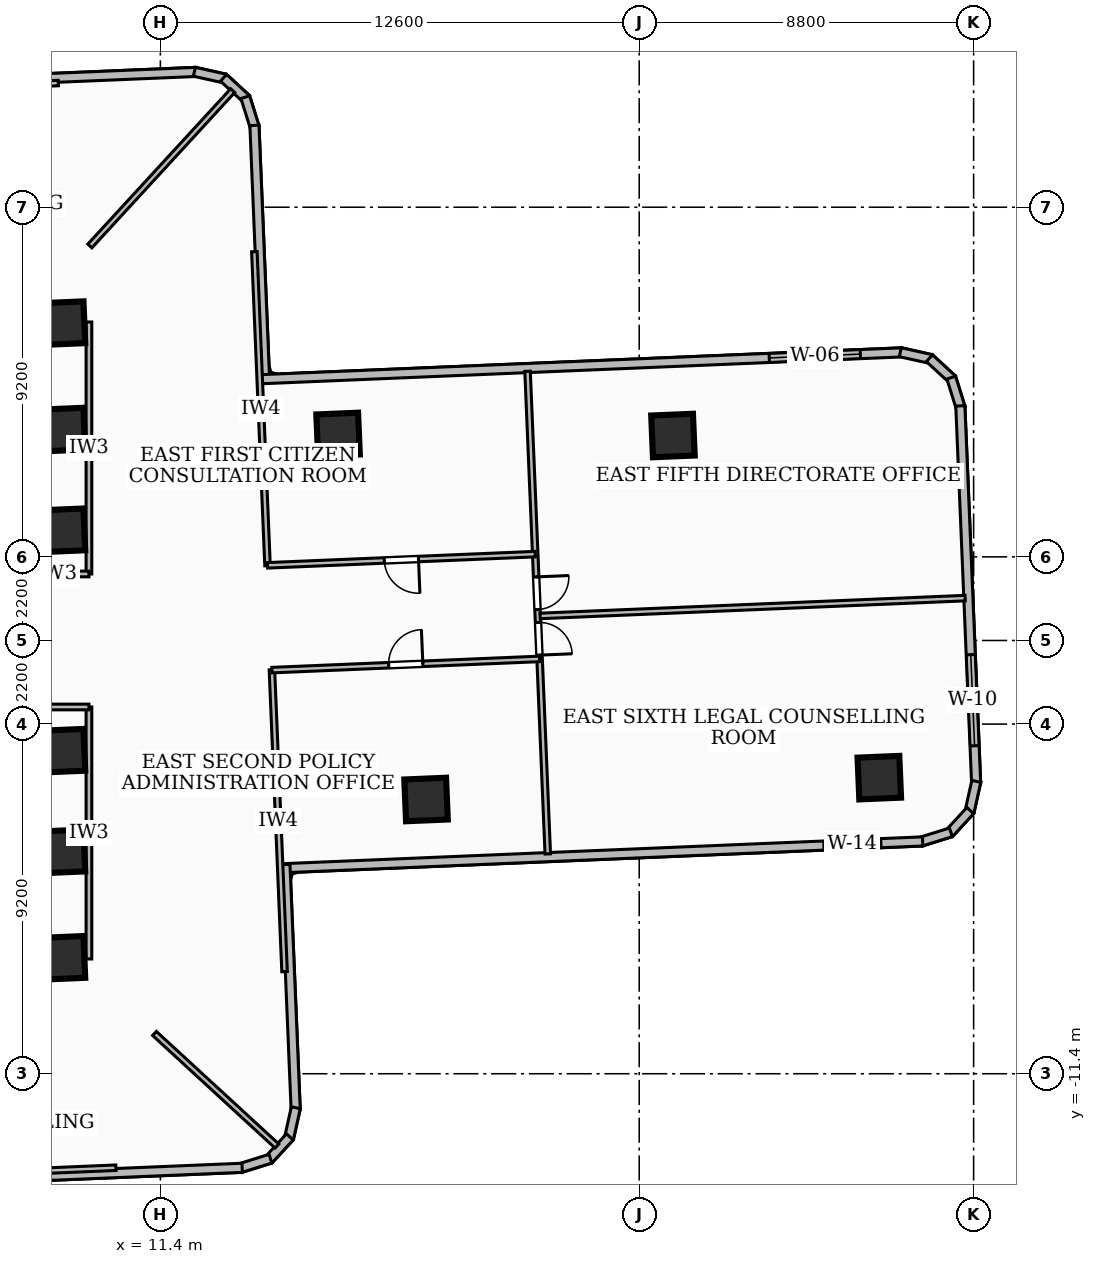
"""IFC4 building model, lengths in metres.
Left out: names, types, materials, properties, quantities, classifications, styles, units other than length and angle.
Written with IfcOpenShell. Run it as: python <this file> out.ifc"""

import sys

from ifc_helpers import new_model, si_unit, direction, frame, frame_2d, origin, origin_2d, place, context, subcontext, project, spatial, rectangle, extrude, element, fill, save


model = new_model("IFC4")
c1 = context("Model", 3, precision=1e-05, world=origin(), true_north=direction((0.0, 1.0)))
c2 = subcontext(c1, "Body", "Model", "MODEL_VIEW")
j1 = project(units=[si_unit("LENGTHUNIT", "METRE"), si_unit("PLANEANGLEUNIT", "RADIAN")], contexts=[c1])
p1 = place(None, origin())
s1 = spatial("IfcSite", under=j1, at=p1, CompositionType="ELEMENT")
p2 = place(p1, origin())
s2 = spatial("IfcBuilding", under=s1, at=p2, CompositionType="ELEMENT")
p3 = place(p2, frame((0.0, 0.0, 42.48)))
s3 = spatial("IfcBuildingStorey", under=s2, at=p3, CompositionType="ELEMENT", Elevation=42.48)
for number, where, z_axis, x_axis in (
    (1, (-8.78, 8.585, 0.0), (0.0, 0.0, 1.0), (1.0, 0.0, 0.0)),
    (2, (8.78, -8.585, 0.0), (0.0, 0.0, 1.0), (-1.0, 0.0, 0.0)),
):
    element("IfcWall", number, at=place(p3, frame(where, z_axis=z_axis, x_axis=x_axis)), inside=s3, PredefinedType="SHEAR", context=c2, shape_type="SweptSolid", body=[
        extrude(rectangle(XDim=17.56, YDim=0.55, at=frame_2d((8.78, 0.0))), origin(), (0.0, 0.0, 1.0), 3.34),
    ])
for number, where, z_axis, x_axis in (
    (3, (8.85, -5.55, 0.0), (0.0, 0.0, 1.0), (0.999, 0.042, 0.0)),
    (4, (8.85, -2.9, 0.0), (0.0, 0.0, 1.0), (0.999, 0.042, 0.0)),
    (5, (8.85, 2.9, 0.0), (0.0, 0.0, 1.0), (0.999, 0.042, 0.0)),
    (6, (8.85, 5.55, 0.0), (0.0, 0.0, 1.0), (0.999, 0.042, 0.0)),
    (7, (8.85, -8.35, 0.0), (0.0, 0.0, 1.0), (0.999, 0.042, 0.0)),
    (8, (8.85, 8.35, 0.0), (0.0, 0.0, 1.0), (0.999, 0.042, 0.0)),
    (9, (18.391, -4.184, 0.0), (0.0, 0.0, 1.0), (0.999, 0.042, 0.0)),
    (10, (16.076, 5.421, 0.0), (0.0, 0.0, 1.0), (0.999, 0.042, 0.0)),
    (11, (30.318, -3.609, 0.0), (0.0, 0.0, 1.0), (0.999, 0.042, 0.0)),
    (12, (24.888, 5.393, 0.0), (0.0, 0.0, 1.0), (0.999, 0.042, 0.0)),
):
    element("IfcColumn", number, at=place(p3, frame(where, z_axis=z_axis, x_axis=x_axis)), inside=s3, PredefinedType="COLUMN", context=c2, shape_type="SweptSolid", body=[
        extrude(rectangle(XDim=1.1, YDim=1.1, at=origin_2d()), origin(), (0.0, 0.0, 1.0), 3.6),
    ])
p4 = place(p3, frame((5.894, 14.69, 0.0), z_axis=(0.0, 0.0, 1.0), x_axis=(0.999124860845, 0.041827173477, 0.0)))
e13 = element("IfcWall", 13, at=p4, inside=s3, PredefinedType="SOLIDWALL", context=c2, shape_type="SweptSolid", body=[
    extrude(rectangle(XDim=6.456, YDim=0.24, at=frame_2d((3.228, 0.0))), origin(), (0.0, 0.0, 1.0), 2.421),
])
p5 = place(p3, frame((12.295, 14.964, 0.0), z_axis=(0.0, 0.0, 1.0), x_axis=(0.976089939158, -0.21736704137, 0.0)))
e14 = element("IfcWall", 14, at=p5, inside=s3, PredefinedType="SOLIDWALL", context=c2, shape_type="SweptSolid", body=[
    extrude(rectangle(XDim=0.829, YDim=0.24, at=frame_2d((0.415, 0.0))), origin(), (0.0, 0.0, 1.0), 3.34),
])
p6 = place(p3, frame((13.062, 14.806, 0.0), z_axis=(0.0, 0.0, 1.0), x_axis=(0.735344259965, -0.677693750404, 0.0)))
e15 = element("IfcWall", 15, at=p6, inside=s3, PredefinedType="SOLIDWALL", context=c2, shape_type="SweptSolid", body=[
    extrude(rectangle(XDim=0.813, YDim=0.24, at=frame_2d((0.406, 0.0))), origin(), (0.0, 0.0, 1.0), 3.34),
])
p7 = place(p3, frame((13.635, 14.296, 0.0), z_axis=(0.0, 0.0, 1.0), x_axis=(0.298542680168, -0.954396284631, 0.0)))
e16 = element("IfcWall", 16, at=p7, inside=s3, PredefinedType="SOLIDWALL", context=c2, shape_type="SweptSolid", body=[
    extrude(rectangle(XDim=0.831, YDim=0.24, at=frame_2d((0.416, 0.0))), origin(), (0.0, 0.0, 1.0), 3.34),
])
p8 = place(p3, frame((13.875, 13.552, 0.0), z_axis=(0.0, 0.0, 1.0), x_axis=(0.041765444226, -0.999127443157, 0.0)))
e17 = element("IfcWall", 17, at=p8, inside=s3, PredefinedType="SOLIDWALL", context=c2, shape_type="SweptSolid", body=[
    extrude(rectangle(XDim=6.775, YDim=0.24, at=frame_2d((3.387, 0.0))), origin(), (0.0, 0.0, 1.0), 3.34),
])
p9 = place(p3, frame((14.058, 6.875, 0.0), z_axis=(0.0, 0.0, 1.0), x_axis=(0.999124376175, 0.04183874918, 0.0)))
e18 = element("IfcWall", 18, at=p9, inside=s3, PredefinedType="SOLIDWALL", context=c2, shape_type="SweptSolid", body=[
    extrude(rectangle(XDim=16.876, YDim=0.24, at=frame_2d((8.438, 0.0))), origin(), (0.0, 0.0, 1.0), 3.34),
])
p10 = place(p9, frame((13.376, 0.0, 0.85)))
e19 = element("IfcOpeningElement", 19, at=p10, cuts=e18, PredefinedType="OPENING", context=c2, shape_type="SweptSolid", body=[
    extrude(rectangle(XDim=2.4, YDim=1.85, at=frame_2d((1.2, 0.925))), frame((0.0, 0.13, 0.0), z_axis=(0.0, -1.0, 0.0), x_axis=(1.0, 0.0, 0.0)), (0.0, 0.0, 1.0), 0.26),
])
p11 = place(p3, frame((30.87, 7.585, 0.0), z_axis=(0.0, 0.0, 1.0), x_axis=(0.976138507006, -0.217148831773, 0.0)))
e20 = element("IfcWall", 20, at=p11, inside=s3, PredefinedType="SOLIDWALL", context=c2, shape_type="SweptSolid", body=[
    extrude(rectangle(XDim=0.829, YDim=0.24, at=frame_2d((0.414, 0.0))), origin(), (0.0, 0.0, 1.0), 3.34),
])
p12 = place(p3, frame((31.637, 7.427, 0.0), z_axis=(0.0, 0.0, 1.0), x_axis=(0.73603262681, -0.676946063044, 0.0)))
e21 = element("IfcWall", 21, at=p12, inside=s3, PredefinedType="SOLIDWALL", context=c2, shape_type="SweptSolid", body=[
    extrude(rectangle(XDim=0.814, YDim=0.24, at=frame_2d((0.407, 0.0))), origin(), (0.0, 0.0, 1.0), 3.34),
])
p13 = place(p3, frame((32.211, 6.917, 0.0), z_axis=(0.0, 0.0, 1.0), x_axis=(0.297805793488, -0.954626476359, 0.0)))
e22 = element("IfcWall", 22, at=p13, inside=s3, PredefinedType="SOLIDWALL", context=c2, shape_type="SweptSolid", body=[
    extrude(rectangle(XDim=0.83, YDim=0.24, at=frame_2d((0.415, 0.0))), origin(), (0.0, 0.0, 1.0), 3.34),
])
p14 = place(p3, frame((32.45, 6.174, 0.0), z_axis=(0.0, 0.0, 1.0), x_axis=(0.041857368543, -0.999123596308, 0.0)))
e23 = element("IfcWall", 23, at=p14, inside=s3, PredefinedType="SOLIDWALL", context=c2, shape_type="SweptSolid", body=[
    extrude(rectangle(XDim=9.939, YDim=0.24, at=frame_2d((4.969, 0.0))), origin(), (0.0, 0.0, 1.0), 3.34),
])
p15 = place(p14, frame((6.552, 0.0, 0.85)))
e24 = element("IfcOpeningElement", 24, at=p15, cuts=e23, PredefinedType="OPENING", context=c2, shape_type="SweptSolid", body=[
    extrude(rectangle(XDim=2.4, YDim=1.65, at=frame_2d((1.2, 0.825))), frame((0.0, 0.13, 0.0), z_axis=(0.0, -1.0, 0.0), x_axis=(1.0, 0.0, 0.0)), (0.0, 0.0, 1.0), 0.26),
])
p16 = place(p3, frame((32.87, -3.707, 0.0), z_axis=(0.0, 0.0, 1.0), x_axis=(-0.21711735544, -0.976145508604, 0.0)))
e25 = element("IfcWall", 25, at=p16, inside=s3, PredefinedType="SOLIDWALL", context=c2, shape_type="SweptSolid", body=[
    extrude(rectangle(XDim=0.83, YDim=0.24, at=frame_2d((0.415, 0.0))), origin(), (0.0, 0.0, 1.0), 3.34),
])
p17 = place(p3, frame((32.712, -4.475, 0.0), z_axis=(0.0, 0.0, 1.0), x_axis=(-0.677693750404, -0.735344259965, 0.0)))
e26 = element("IfcWall", 26, at=p17, inside=s3, PredefinedType="SOLIDWALL", context=c2, shape_type="SweptSolid", body=[
    extrude(rectangle(XDim=0.813, YDim=0.24, at=frame_2d((0.406, 0.0))), origin(), (0.0, 0.0, 1.0), 3.34),
])
p18 = place(p3, frame((32.202, -5.048, 0.0), z_axis=(0.0, 0.0, 1.0), x_axis=(-0.954814146828, -0.297203541393, 0.0)))
e27 = element("IfcWall", 27, at=p18, inside=s3, PredefinedType="SOLIDWALL", context=c2, shape_type="SweptSolid", body=[
    extrude(rectangle(XDim=0.831, YDim=0.24, at=frame_2d((0.415, 0.0))), origin(), (0.0, 0.0, 1.0), 3.34),
])
p19 = place(p3, frame((31.458, -5.287, 0.0), z_axis=(0.0, 0.0, 1.0), x_axis=(-0.999122484842, -0.041883890494, 0.0)))
e28 = element("IfcWall", 28, at=p19, inside=s3, PredefinedType="SOLIDWALL", context=c2, shape_type="SweptSolid", body=[
    extrude(rectangle(XDim=16.875, YDim=0.24, at=frame_2d((8.438, 0.0))), origin(), (0.0, 0.0, 1.0), 3.34),
])
p20 = place(p19, frame((1.1, 0.0, 0.85)))
e29 = element("IfcOpeningElement", 29, at=p20, cuts=e28, PredefinedType="OPENING", context=c2, shape_type="SweptSolid", body=[
    extrude(rectangle(XDim=1.5, YDim=1.5, at=frame_2d((0.75, 0.75))), frame((0.0, 0.13, 0.0), z_axis=(0.0, -1.0, 0.0), x_axis=(1.0, 0.0, 0.0)), (0.0, 0.0, 1.0), 0.26),
])
p21 = place(p3, frame((14.69, -5.894, 0.0), z_axis=(0.0, 0.0, 1.0), x_axis=(0.041827173477, -0.999124860845, 0.0)))
e30 = element("IfcWall", 30, at=p21, inside=s3, PredefinedType="SOLIDWALL", context=c2, shape_type="SweptSolid", body=[
    extrude(rectangle(XDim=6.456, YDim=0.24, at=frame_2d((3.228, 0.0))), origin(), (0.0, 0.0, 1.0), 3.34),
])
p22 = place(p3, frame((14.964, -12.295, 0.0), z_axis=(0.0, 0.0, 1.0), x_axis=(-0.21736704137, -0.976089939158, 0.0)))
e31 = element("IfcWall", 31, at=p22, inside=s3, PredefinedType="SOLIDWALL", context=c2, shape_type="SweptSolid", body=[
    extrude(rectangle(XDim=0.829, YDim=0.24, at=frame_2d((0.415, 0.0))), origin(), (0.0, 0.0, 1.0), 3.34),
])
p23 = place(p3, frame((14.806, -13.062, 0.0), z_axis=(0.0, 0.0, 1.0), x_axis=(-0.677693750404, -0.735344259965, 0.0)))
e32 = element("IfcWall", 32, at=p23, inside=s3, PredefinedType="SOLIDWALL", context=c2, shape_type="SweptSolid", body=[
    extrude(rectangle(XDim=0.813, YDim=0.24, at=frame_2d((0.406, 0.0))), origin(), (0.0, 0.0, 1.0), 3.34),
])
p24 = place(p3, frame((14.296, -13.635, 0.0), z_axis=(0.0, 0.0, 1.0), x_axis=(-0.954396284631, -0.298542680168, 0.0)))
e33 = element("IfcWall", 33, at=p24, inside=s3, PredefinedType="SOLIDWALL", context=c2, shape_type="SweptSolid", body=[
    extrude(rectangle(XDim=0.831, YDim=0.24, at=frame_2d((0.416, 0.0))), origin(), (0.0, 0.0, 1.0), 3.34),
])
p25 = place(p3, frame((13.552, -13.875, 0.0), z_axis=(0.0, 0.0, 1.0), x_axis=(-0.999127443157, -0.041765444226, 0.0)))
e34 = element("IfcWall", 34, at=p25, inside=s3, PredefinedType="SOLIDWALL", context=c2, shape_type="SweptSolid", body=[
    extrude(rectangle(XDim=6.775, YDim=0.24, at=frame_2d((3.387, 0.0))), origin(), (0.0, 0.0, 1.0), 3.34),
])
p26 = place(p3, frame((9.52, 1.75, 0.0), z_axis=(0.0, 0.0, 1.0), x_axis=(0.0, 1.0, 0.0)))
e35 = element("IfcWall", 35, at=p26, inside=s3, PredefinedType="PARTITIONING", context=c2, shape_type="SweptSolid", body=[
    extrude(rectangle(XDim=6.63, YDim=0.15, at=frame_2d((3.315, 0.0))), origin(), (0.0, 0.0, 1.0), 2.421),
])
p27 = place(p3, frame((7.85, 1.75, 0.0), z_axis=(0.0, 0.0, 1.0), x_axis=(1.0, 0.0, 0.0)))
e36 = element("IfcWall", 36, at=p27, inside=s3, PredefinedType="PARTITIONING", context=c2, shape_type="SweptSolid", body=[
    extrude(rectangle(XDim=1.67, YDim=0.15, at=frame_2d((0.835, 0.0))), origin(), (0.0, 0.0, 1.0), 2.405),
])
p28 = place(p3, frame((9.52, -8.38, 0.0), z_axis=(0.0, 0.0, 1.0), x_axis=(0.0, 1.0, 0.0)))
e37 = element("IfcWall", 37, at=p28, inside=s3, PredefinedType="PARTITIONING", context=c2, shape_type="SweptSolid", body=[
    extrude(rectangle(XDim=6.63, YDim=0.15, at=frame_2d((3.315, 0.0))), origin(), (0.0, 0.0, 1.0), 2.421),
])
p29 = place(p3, frame((7.85, -1.75, 0.0), z_axis=(0.0, 0.0, 1.0), x_axis=(1.0, 0.0, 0.0)))
e38 = element("IfcWall", 38, at=p29, inside=s3, PredefinedType="PARTITIONING", context=c2, shape_type="SweptSolid", body=[
    extrude(rectangle(XDim=1.67, YDim=0.15, at=frame_2d((0.835, 0.0))), origin(), (0.0, 0.0, 1.0), 2.405),
])
p30 = place(p3, frame((9.544, 10.38, 0.0), z_axis=(0.0, 0.0, 1.0), x_axis=(0.676856513188, 0.736114977809, 0.0)))
e39 = element("IfcWall", 39, at=p30, inside=s3, PredefinedType="PARTITIONING", context=c2, shape_type="SweptSolid", body=[
    extrude(rectangle(XDim=5.554, YDim=0.145, at=frame_2d((2.777, 0.0))), origin(), (0.0, 0.0, 1.0), 3.34),
])
p31 = place(p3, frame((11.245, -10.34, 0.0), z_axis=(0.0, 0.0, 1.0), x_axis=(0.736178820698, -0.676787074312, 0.0)))
e40 = element("IfcWall", 40, at=p31, inside=s3, PredefinedType="PARTITIONING", context=c2, shape_type="SweptSolid", body=[
    extrude(rectangle(XDim=4.378, YDim=0.145, at=frame_2d((2.189, 0.0))), origin(), (0.0, 0.0, 1.0), 3.34),
])
p32 = place(p3, frame((14.22, 1.967, 0.0), z_axis=(0.0, 0.0, 1.0), x_axis=(-0.041948565382, 0.99911977153, 0.0)))
e41 = element("IfcWall", 41, at=p32, inside=s3, PredefinedType="PARTITIONING", context=c2, shape_type="SweptSolid", body=[
    extrude(rectangle(XDim=8.27, YDim=0.145, at=frame_2d((4.135, 0.0))), origin(), (0.0, 0.0, 1.0), 2.421),
])
p33 = place(p3, frame((14.668, -8.714, 0.0), z_axis=(0.0, 0.0, 1.0), x_axis=(-0.041882146625, 0.999122557945, 0.0)))
e42 = element("IfcWall", 42, at=p33, inside=s3, PredefinedType="PARTITIONING", context=c2, shape_type="SweptSolid", body=[
    extrude(rectangle(XDim=7.951, YDim=0.145, at=frame_2d((3.976, 0.0))), origin(), (0.0, 0.0, 1.0), 2.421),
])
p34 = place(p3, frame((21.263, 2.272, 0.0), z_axis=(0.0, 0.0, 1.0), x_axis=(-0.999124408039, -0.041837988246, 0.0)))
e43 = element("IfcWall", 43, at=p34, inside=s3, PredefinedType="PARTITIONING", context=c2, shape_type="SweptSolid", body=[
    extrude(rectangle(XDim=7.049, YDim=0.145, at=frame_2d((3.524, 0.0))), origin(), (0.0, 0.0, 1.0), 3.34),
])
p35 = place(p34, frame((3.074, 0.0, 0.0)))
e44 = element("IfcOpeningElement", 44, at=p35, cuts=e43, PredefinedType="OPENING", context=c2, shape_type="SweptSolid", body=[
    extrude(rectangle(XDim=0.9, YDim=2.06, at=frame_2d((0.45, 1.03))), frame((0.0, 0.083, 0.0), z_axis=(0.0, -1.0, 0.0), x_axis=(1.0, 0.0, 0.0)), (0.0, 0.0, 1.0), 0.165),
])
p36 = place(p3, frame((14.335, -0.78, 0.0), z_axis=(0.0, 0.0, 1.0), x_axis=(0.999124650485, 0.041832198038, 0.0)))
e45 = element("IfcWall", 45, at=p36, inside=s3, PredefinedType="PARTITIONING", context=c2, shape_type="SweptSolid", body=[
    extrude(rectangle(XDim=7.05, YDim=0.145, at=frame_2d((3.525, 0.0))), origin(), (0.0, 0.0, 1.0), 3.34),
])
p37 = place(p36, frame((3.075, 0.0, 0.0)))
e46 = element("IfcOpeningElement", 46, at=p37, cuts=e45, PredefinedType="OPENING", context=c2, shape_type="SweptSolid", body=[
    extrude(rectangle(XDim=0.9, YDim=2.06, at=frame_2d((0.45, 1.03))), frame((0.0, 0.083, 0.0), z_axis=(0.0, -1.0, 0.0), x_axis=(1.0, 0.0, 0.0)), (0.0, 0.0, 1.0), 0.165),
])
p38 = place(p3, frame((21.392, 0.646, 0.0), z_axis=(0.0, 0.0, 1.0), x_axis=(0.999122039379, 0.041894515479, 0.0)))
e47 = element("IfcWall", 47, at=p38, inside=s3, PredefinedType="PARTITIONING", context=c2, shape_type="SweptSolid", body=[
    extrude(rectangle(XDim=11.195, YDim=0.145, at=frame_2d((5.597, 0.0))), origin(), (0.0, 0.0, 1.0), 2.832),
])
p39 = place(p3, frame((21.062, 7.083, 0.0), z_axis=(0.0, 0.0, 1.0), x_axis=(0.041855051962, -0.999123693356, 0.0)))
e48 = element("IfcWall", 48, at=p39, inside=s3, PredefinedType="PARTITIONING", context=c2, shape_type="SweptSolid", body=[
    extrude(rectangle(XDim=12.71, YDim=0.145, at=frame_2d((6.355, 0.0))), origin(), (0.0, 0.0, 1.0), 2.421),
])
p40 = place(p39, frame((6.615, 0.0, 0.0)))
e49 = element("IfcOpeningElement", 49, at=p40, cuts=e48, PredefinedType="OPENING", context=c2, shape_type="SweptSolid", body=[
    extrude(rectangle(XDim=0.86, YDim=2.04, at=frame_2d((0.43, 1.02))), frame((0.0, 0.083, 0.0), z_axis=(0.0, -1.0, 0.0), x_axis=(1.0, 0.0, 0.0)), (0.0, 0.0, 1.0), 0.165),
])
p41 = place(p39, frame((5.415, 0.0, 0.0)))
e50 = element("IfcOpeningElement", 50, at=p41, cuts=e48, PredefinedType="OPENING", context=c2, shape_type="SweptSolid", body=[
    extrude(rectangle(XDim=0.86, YDim=2.04, at=frame_2d((0.43, 1.02))), frame((0.0, 0.083, 0.0), z_axis=(0.0, -1.0, 0.0), x_axis=(1.0, 0.0, 0.0)), (0.0, 0.0, 1.0), 0.165),
])
p42 = place(p3, frame((8.714, 14.668, 0.0), z_axis=(0.0, 0.0, 1.0), x_axis=(-0.999122557945, -0.041882146625, 0.0)))
e51 = element("IfcWall", 51, at=p42, inside=s3, PredefinedType="PARTITIONING", context=c2, shape_type="SweptSolid", body=[
    extrude(rectangle(XDim=7.951, YDim=0.145, at=frame_2d((3.976, 0.0))), origin(), (0.0, 0.0, 1.0), 2.421),
])
p43 = place(p3, frame((1.967, -14.22, 0.0), z_axis=(0.0, 0.0, 1.0), x_axis=(0.99911977153, 0.041948565382, 0.0)))
e52 = element("IfcWall", 52, at=p43, inside=s3, PredefinedType="PARTITIONING", context=c2, shape_type="SweptSolid", body=[
    extrude(rectangle(XDim=8.27, YDim=0.145, at=frame_2d((4.135, 0.0))), origin(), (0.0, 0.0, 1.0), 2.421),
])
p44 = place(p10, origin())
e53 = element("IfcWindow", 53, at=p44, inside=s3, PartitioningType="SINGLE_PANEL", PredefinedType="WINDOW", context=c2, shape_type="SweptSolid", body=[
    extrude(rectangle(XDim=2.4, YDim=1.85, at=frame_2d((1.2, 0.925))), frame((0.0, 0.03, 0.0), z_axis=(0.0, -1.0, 0.0), x_axis=(1.0, 0.0, 0.0)), (0.0, 0.0, 1.0), 0.06),
])
fill(e19, e53)
p45 = place(p15, origin())
e54 = element("IfcWindow", 54, at=p45, inside=s3, PartitioningType="SINGLE_PANEL", PredefinedType="WINDOW", context=c2, shape_type="SweptSolid", body=[
    extrude(rectangle(XDim=2.4, YDim=1.65, at=frame_2d((1.2, 0.825))), frame((0.0, 0.03, 0.0), z_axis=(0.0, -1.0, 0.0), x_axis=(1.0, 0.0, 0.0)), (0.0, 0.0, 1.0), 0.06),
])
fill(e24, e54)
p46 = place(p20, origin())
e55 = element("IfcWindow", 55, at=p46, inside=s3, PartitioningType="SINGLE_PANEL", PredefinedType="WINDOW", context=c2, shape_type="SweptSolid", body=[
    extrude(rectangle(XDim=1.5, YDim=1.5, at=frame_2d((0.75, 0.75))), frame((0.0, 0.03, 0.0), z_axis=(0.0, -1.0, 0.0), x_axis=(1.0, 0.0, 0.0)), (0.0, 0.0, 1.0), 0.06),
])
fill(e29, e55)
p47 = place(p35, origin())
e56 = element("IfcDoor", 56, at=p47, inside=s3, OperationType="SINGLE_SWING_LEFT", PredefinedType="DOOR", context=c2, shape_type="SweptSolid", body=[
    extrude(rectangle(XDim=0.9, YDim=2.06, at=frame_2d((0.45, 1.03))), frame((0.0, 0.025, 0.0), z_axis=(0.0, -1.0, 0.0), x_axis=(1.0, 0.0, 0.0)), (0.0, 0.0, 1.0), 0.05),
])
fill(e44, e56)
p48 = place(p37, origin())
e57 = element("IfcDoor", 57, at=p48, inside=s3, OperationType="SINGLE_SWING_RIGHT", PredefinedType="DOOR", context=c2, shape_type="SweptSolid", body=[
    extrude(rectangle(XDim=0.9, YDim=2.06, at=frame_2d((0.45, 1.03))), frame((0.0, 0.025, 0.0), z_axis=(0.0, -1.0, 0.0), x_axis=(1.0, 0.0, 0.0)), (0.0, 0.0, 1.0), 0.05),
])
fill(e46, e57)
p49 = place(p40, origin())
e58 = element("IfcDoor", 58, at=p49, inside=s3, OperationType="SINGLE_SWING_RIGHT", PredefinedType="DOOR", context=c2, shape_type="SweptSolid", body=[
    extrude(rectangle(XDim=0.86, YDim=2.04, at=frame_2d((0.43, 1.02))), frame((0.0, 0.025, 0.0), z_axis=(0.0, -1.0, 0.0), x_axis=(1.0, 0.0, 0.0)), (0.0, 0.0, 1.0), 0.05),
])
fill(e49, e58)
p50 = place(p41, origin())
e59 = element("IfcDoor", 59, at=p50, inside=s3, OperationType="SINGLE_SWING_LEFT", PredefinedType="DOOR", context=c2, shape_type="SweptSolid", body=[
    extrude(rectangle(XDim=0.86, YDim=2.04, at=frame_2d((0.43, 1.02))), frame((0.0, 0.025, 0.0), z_axis=(0.0, -1.0, 0.0), x_axis=(1.0, 0.0, 0.0)), (0.0, 0.0, 1.0), 0.05),
])
fill(e50, e59)
save(model, sys.argv[1])
